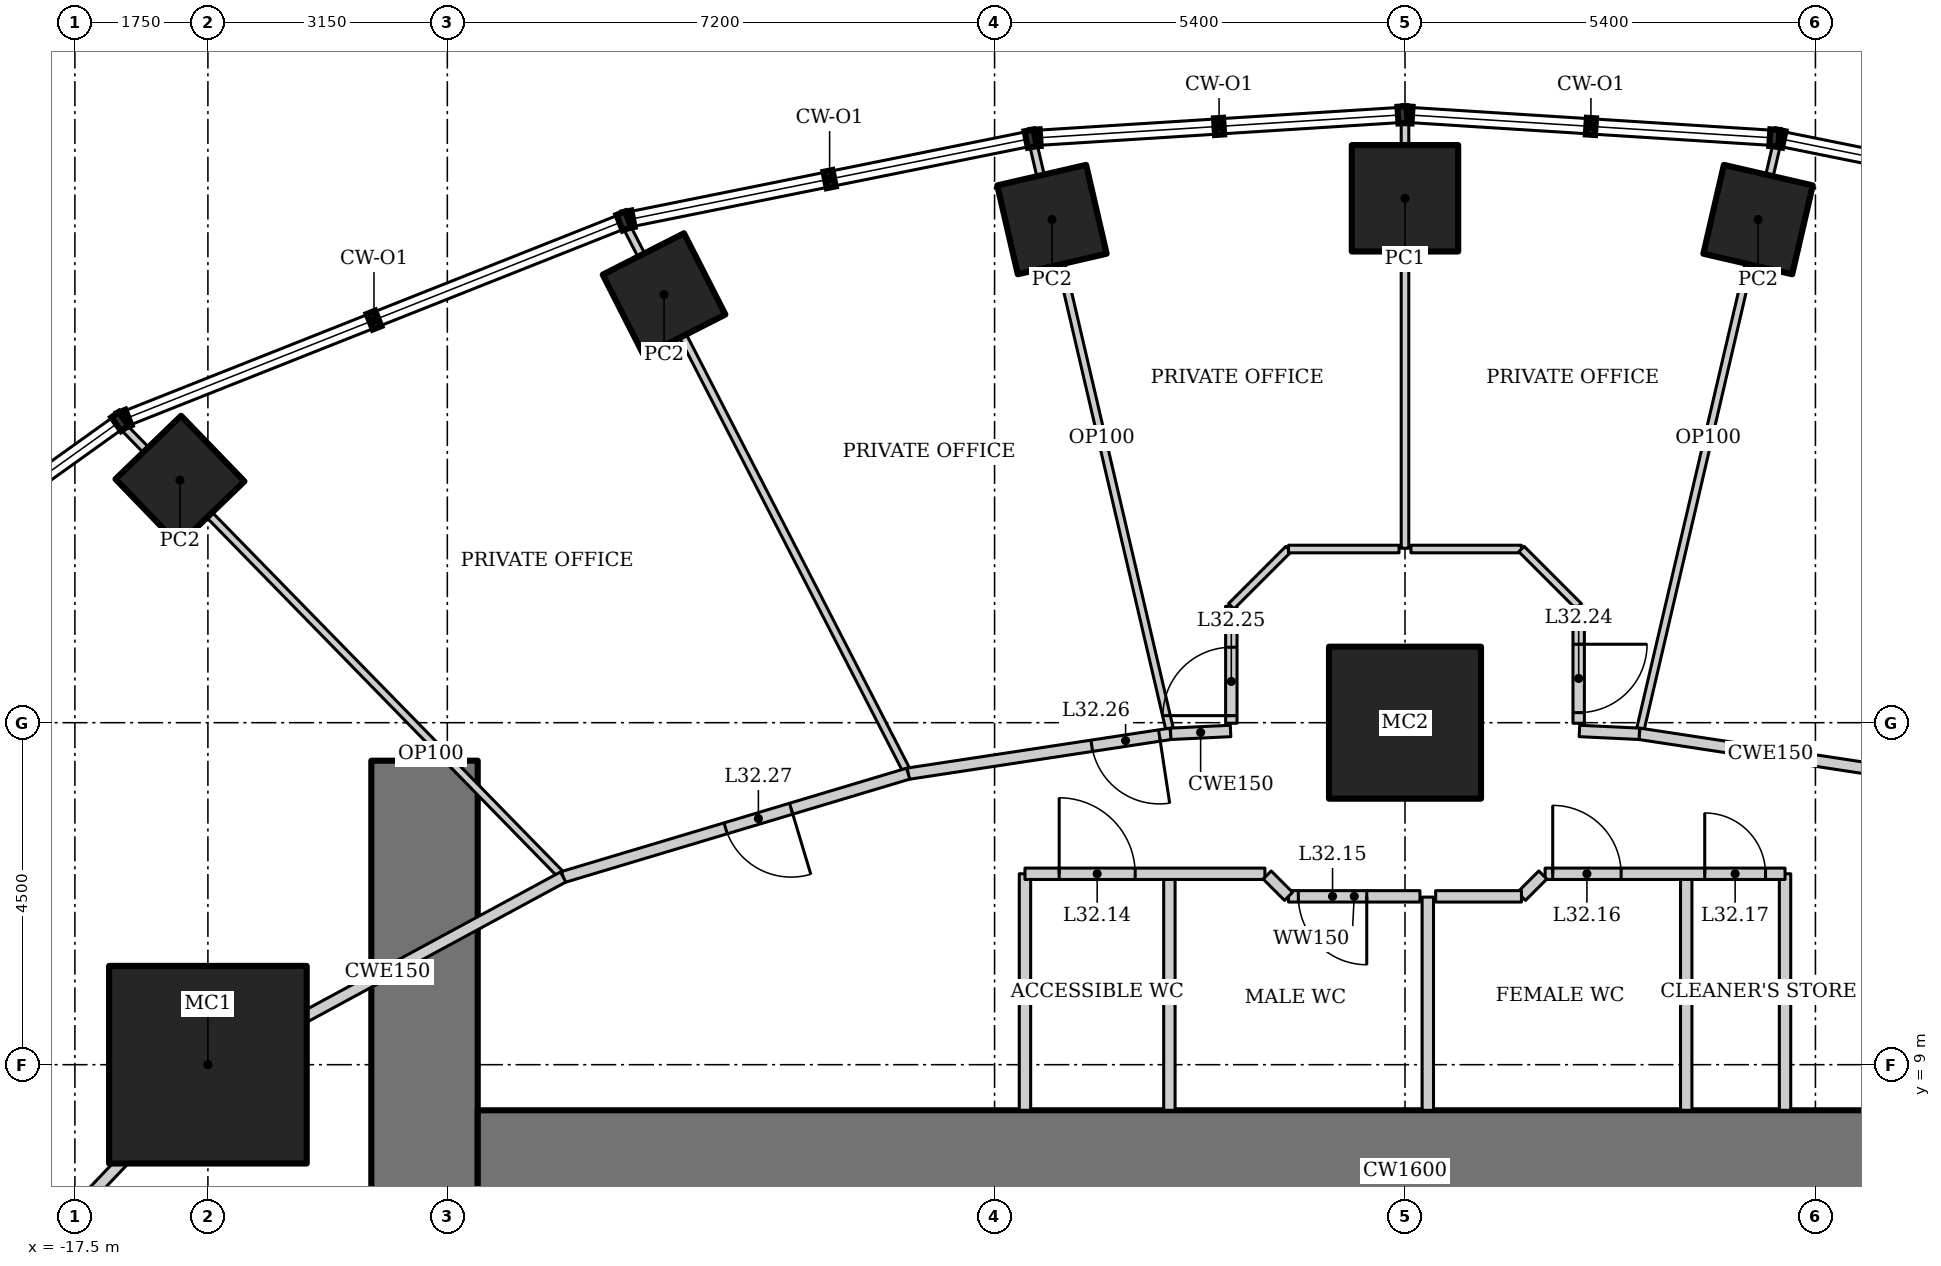
"""IFC4 building model, lengths in metres.
Left out: names, types, materials, properties, quantities, classifications, styles, units other than length and angle.
Written with IfcOpenShell. Run it as: python <this file> out.ifc"""

import sys

from ifc_helpers import new_model, si_unit, direction, frame, frame_2d, origin, origin_2d, place, context, subcontext, project, spatial, rectangle, hollow_rectangle, extrude, element, fill, save


model = new_model("IFC4")
c1 = context("Model", 3, precision=1e-05, world=origin(), true_north=direction((0.0, 1.0)))
c2 = subcontext(c1, "Body", "Model", "MODEL_VIEW")
j1 = project(units=[si_unit("LENGTHUNIT", "METRE"), si_unit("PLANEANGLEUNIT", "RADIAN")], contexts=[c1])
p1 = place(None, origin())
s1 = spatial("IfcSite", under=j1, at=p1, CompositionType="ELEMENT")
p2 = place(p1, origin())
s2 = spatial("IfcBuilding", under=s1, at=p2, CompositionType="ELEMENT")
p3 = place(p2, frame((0.0, 0.0, 138.4)))
s3 = spatial("IfcBuildingStorey", under=s2, at=p3, CompositionType="ELEMENT", Elevation=138.4)
p4 = place(p3, frame((0.0, 13.5, 0.0), z_axis=(0.0, 0.0, 1.0), x_axis=(1.0, 0.0, 0.0)))
e1 = element("IfcColumn", 1, at=p4, inside=s3, PredefinedType="COLUMN", context=c2, shape_type="SweptSolid", body=[
    extrude(hollow_rectangle(XDim=2.0, YDim=2.0, WallThickness=0.17, at=origin_2d()), origin(), (0.0, 0.0, 1.0), 4.2),
])
p5 = place(p3, frame((-15.75, 9.0, 0.0), z_axis=(0.0, 0.0, 1.0), x_axis=(1.0, 0.0, 0.0)))
e2 = element("IfcColumn", 2, at=p5, inside=s3, PredefinedType="COLUMN", context=c2, shape_type="SweptSolid", body=[
    extrude(hollow_rectangle(XDim=2.6, YDim=2.6, WallThickness=0.13, at=origin_2d()), origin(), (0.0, 0.0, 1.0), 4.2),
])
p6 = place(p3, frame((4.645, 20.12, 0.0), z_axis=(0.0, 0.0, 1.0), x_axis=(0.224951054344, 0.974370064785, 0.0)))
e3 = element("IfcColumn", 3, at=p6, inside=s3, PredefinedType="COLUMN", context=c2, shape_type="SweptSolid", body=[
    extrude(hollow_rectangle(XDim=1.2, YDim=1.2, WallThickness=0.1, at=origin_2d()), origin(), (0.0, 0.0, 1.0), 4.2),
])
p7 = place(p3, frame((0.0, 20.4, 0.0), z_axis=(0.0, 0.0, 1.0), x_axis=(1.0, 0.0, 0.0)))
e4 = element("IfcColumn", 4, at=p7, inside=s3, PredefinedType="COLUMN", context=c2, shape_type="SweptSolid", body=[
    extrude(hollow_rectangle(XDim=1.4, YDim=1.4, WallThickness=0.1, at=origin_2d()), origin(), (0.0, 0.0, 1.0), 4.2),
])
for number, where, z_axis, x_axis in (
    (5, (-4.645, 20.12, 0.0), (0.0, 0.0, 1.0), (0.974, 0.225, 0.0)),
    (6, (-9.749, 19.133, 0.0), (0.0, 0.0, 1.0), (0.891, 0.454, 0.0)),
    (7, (-16.118, 16.69, 0.0), (0.0, 0.0, 1.0), (0.719, 0.695, 0.0)),
):
    element("IfcColumn", number, at=place(p3, frame(where, z_axis=z_axis, x_axis=x_axis)), inside=s3, PredefinedType="COLUMN", context=c2, shape_type="SweptSolid", body=[
        extrude(hollow_rectangle(XDim=1.2, YDim=1.2, WallThickness=0.1, at=origin_2d()), origin(), (0.0, 0.0, 1.0), 4.2),
    ])
p8 = place(p3, frame((-12.9, 13.0, 0.0), z_axis=(0.0, 0.0, 1.0), x_axis=(0.0, -1.0, 0.0)))
e8 = element("IfcWall", 8, at=p8, inside=s3, PredefinedType="SHEAR", context=c2, shape_type="SweptSolid", body=[
    extrude(rectangle(XDim=26.0, YDim=1.4, at=frame_2d((13.0, 0.0))), origin(), (0.0, 0.0, 1.0), 4.2),
])
p9 = place(p8, frame((12.1, 0.0, 0.0)))
e9 = element("IfcOpeningElement", 9, at=p9, cuts=e8, PredefinedType="OPENING", context=c2, shape_type="SweptSolid", body=[
    extrude(rectangle(XDim=1.8, YDim=2.1, at=frame_2d((0.9, 1.05))), frame((0.0, 0.71, 0.0), z_axis=(0.0, -1.0, 0.0), x_axis=(1.0, 0.0, 0.0)), (0.0, 0.0, 1.0), 1.42),
])
p10 = place(p3, frame((12.2, 7.6, 0.0), z_axis=(0.0, 0.0, 1.0), x_axis=(-1.0, 0.0, 0.0)))
e10 = element("IfcWall", 10, at=p10, inside=s3, PredefinedType="SHEAR", context=c2, shape_type="SweptSolid", body=[
    extrude(rectangle(XDim=24.4, YDim=1.6, at=frame_2d((12.2, 0.0))), origin(), (0.0, 0.0, 1.0), 4.2),
])
for number, where, z_axis, x_axis in (
    (11, (4.897, 21.135, 0.0), (0.0, 0.0, 1.0), (-0.227, -0.974, 0.0)),
    (12, (-4.897, 21.135, 0.0), (0.0, 0.0, 1.0), (0.227, -0.974, 0.0)),
):
    element("IfcWall", number, at=place(p3, frame(where, z_axis=z_axis, x_axis=x_axis)), inside=s3, PredefinedType="PARTITIONING", context=c2, shape_type="SweptSolid", body=[
        extrude(rectangle(XDim=7.99, YDim=0.1, at=frame_2d((3.995, 0.0))), origin(), (0.0, 0.0, 1.0), 3.293),
    ])
p11 = place(p3, frame((-10.253, 20.052, 0.0), z_axis=(0.0, 0.0, 1.0), x_axis=(0.457535449567, -0.889191381194, 0.0)))
e13 = element("IfcWall", 13, at=p11, inside=s3, PredefinedType="PARTITIONING", context=c2, shape_type="SweptSolid", body=[
    extrude(rectangle(XDim=8.123, YDim=0.1, at=frame_2d((4.061, 0.0))), origin(), (0.0, 0.0, 1.0), 3.349),
])
p12 = place(p3, frame((-16.882, 17.414, 0.0), z_axis=(0.0, 0.0, 1.0), x_axis=(0.698758056249, -0.715358077348, 0.0)))
e14 = element("IfcWall", 14, at=p12, inside=s3, PredefinedType="PARTITIONING", context=c2, shape_type="SweptSolid", body=[
    extrude(rectangle(XDim=8.31, YDim=0.1, at=frame_2d((4.155, 0.0))), origin(), (0.0, 0.0, 1.0), 3.321),
])
p13 = place(p3, frame((6.537, 12.829, 0.0), z_axis=(0.0, 0.0, 1.0), x_axis=(-0.988668719464, 0.150113833987, 0.0)))
e15 = element("IfcWall", 15, at=p13, inside=s3, PredefinedType="PARTITIONING", context=c2, shape_type="SweptSolid", body=[
    extrude(rectangle(XDim=3.493, YDim=0.15, at=frame_2d((1.747, 0.0))), origin(), (0.0, 0.0, 1.0), 4.05),
])
p14 = place(p3, frame((-3.083, 13.354, 0.0), z_axis=(0.0, 0.0, 1.0), x_axis=(-0.988668719464, -0.150113833987, 0.0)))
e16 = element("IfcWall", 16, at=p14, inside=s3, PredefinedType="PARTITIONING", context=c2, shape_type="SweptSolid", body=[
    extrude(rectangle(XDim=3.493, YDim=0.15, at=frame_2d((1.747, 0.0))), origin(), (0.0, 0.0, 1.0), 4.05),
])
p15 = place(p14, frame((0.15, 0.0, 0.0)))
e17 = element("IfcOpeningElement", 17, at=p15, cuts=e16, PredefinedType="OPENING", context=c2, shape_type="SweptSolid", body=[
    extrude(rectangle(XDim=0.9, YDim=2.1, at=frame_2d((0.45, 1.05))), frame((0.0, 0.085, 0.0), z_axis=(0.0, -1.0, 0.0), x_axis=(1.0, 0.0, 0.0)), (0.0, 0.0, 1.0), 0.17),
])
p16 = place(p3, frame((-6.537, 12.829, 0.0), z_axis=(0.0, 0.0, 1.0), x_axis=(-0.957933992798, -0.286988615527, 0.0)))
e18 = element("IfcWall", 18, at=p16, inside=s3, PredefinedType="PARTITIONING", context=c2, shape_type="SweptSolid", body=[
    extrude(rectangle(XDim=4.738, YDim=0.15, at=frame_2d((2.369, 0.0))), origin(), (0.0, 0.0, 1.0), 4.05),
])
p17 = place(p16, frame((1.607, 0.0, 0.0)))
e19 = element("IfcOpeningElement", 19, at=p17, cuts=e18, PredefinedType="OPENING", context=c2, shape_type="SweptSolid", body=[
    extrude(rectangle(XDim=0.9, YDim=2.1, at=frame_2d((0.45, 1.05))), frame((0.0, 0.085, 0.0), z_axis=(0.0, -1.0, 0.0), x_axis=(1.0, 0.0, 0.0)), (0.0, 0.0, 1.0), 0.17),
])
p18 = place(p3, frame((-11.076, 11.469, 0.0), z_axis=(0.0, 0.0, 1.0), x_axis=(-0.879436285334, -0.476016617397, 0.0)))
e20 = element("IfcWall", 20, at=p18, inside=s3, PredefinedType="PARTITIONING", context=c2, shape_type="SweptSolid", body=[
    extrude(rectangle(XDim=5.253, YDim=0.15, at=frame_2d((2.626, 0.0))), origin(), (0.0, 0.0, 1.0), 4.05),
])
p19 = place(p3, frame((-15.696, 8.969, 0.0), z_axis=(0.0, 0.0, 1.0), x_axis=(-0.688797257101, -0.72495402517, 0.0)))
e21 = element("IfcWall", 21, at=p19, inside=s3, PredefinedType="PARTITIONING", context=c2, shape_type="SweptSolid", body=[
    extrude(rectangle(XDim=5.638, YDim=0.15, at=frame_2d((2.819, 0.0))), origin(), (0.0, 0.0, 1.0), 4.05),
])
p20 = place(p19, frame((4.588, 0.0, 0.0)))
e22 = element("IfcOpeningElement", 22, at=p20, cuts=e21, PredefinedType="OPENING", context=c2, shape_type="SweptSolid", body=[
    extrude(rectangle(XDim=0.9, YDim=2.1, at=frame_2d((0.45, 1.05))), frame((0.0, 0.085, 0.0), z_axis=(0.0, -1.0, 0.0), x_axis=(1.0, 0.0, 0.0)), (0.0, 0.0, 1.0), 0.17),
])
for number, where, z_axis, x_axis in (
    (23, (-5.0, 8.4, 0.0), (0.0, 0.0, 1.0), (0.0, 1.0, 0.0)),
    (24, (5.0, 8.4, 0.0), (0.0, 0.0, 1.0), (0.0, 1.0, 0.0)),
    (25, (-3.1, 8.4, 0.0), (0.0, 0.0, 1.0), (0.0, 1.0, 0.0)),
    (26, (3.7, 8.4, 0.0), (0.0, 0.0, 1.0), (0.0, 1.0, 0.0)),
):
    element("IfcWall", number, at=place(p3, frame(where, z_axis=z_axis, x_axis=x_axis)), inside=s3, PredefinedType="SOLIDWALL", context=c2, shape_type="SweptSolid", body=[
        extrude(rectangle(XDim=3.112, YDim=0.15, at=frame_2d((1.556, 0.0))), origin(), (0.0, 0.0, 1.0), 4.05),
    ])
p21 = place(p3, frame((-12.9, 13.0, 0.0), z_axis=(0.0, 0.0, 1.0), x_axis=(0.714845300066, 0.699282630253, 0.0)))
e27 = element("IfcWall", 27, at=p21, inside=s3, PredefinedType="PARTITIONING", context=c2, shape_type="SweptSolid", body=[
    extrude(rectangle(XDim=0.235, YDim=0.1, at=frame_2d((0.118, 0.0))), origin(), (0.0, 0.0, 1.0), 4.05),
])
p22 = place(p3, frame((0.0, 21.445, 0.0), z_axis=(0.0, 0.0, 1.0), x_axis=(0.0, -1.0, 0.0)))
e28 = element("IfcWall", 28, at=p22, inside=s3, PredefinedType="PARTITIONING", context=c2, shape_type="SweptSolid", body=[
    extrude(rectangle(XDim=5.65, YDim=0.1, at=frame_2d((2.825, 0.0))), origin(), (0.0, 0.0, 1.0), 3.646),
])
for number, where, z_axis, x_axis in (
    (29, (3.083, 13.354, 0.0), (0.0, 0.0, 1.0), (-0.999, 0.047, 0.0)),
    (30, (-2.295, 13.391, 0.0), (0.0, 0.0, 1.0), (-0.999, -0.047, 0.0)),
):
    element("IfcWall", number, at=place(p3, frame(where, z_axis=z_axis, x_axis=x_axis)), inside=s3, PredefinedType="PARTITIONING", context=c2, shape_type="SweptSolid", body=[
        extrude(rectangle(XDim=0.789, YDim=0.15, at=frame_2d((0.395, 0.0))), origin(), (0.0, 0.0, 1.0), 4.05),
    ])
p23 = place(p3, frame((-5.0, 11.512, 0.0), z_axis=(0.0, 0.0, 1.0), x_axis=(1.0, 0.0, 0.0)))
e31 = element("IfcWall", 31, at=p23, inside=s3, PredefinedType="SOLIDWALL", context=c2, shape_type="SweptSolid", body=[
    extrude(rectangle(XDim=3.156, YDim=0.15, at=frame_2d((1.578, 0.0))), origin(), (0.0, 0.0, 1.0), 4.05),
])
p24 = place(p23, frame((0.45, 0.0, 0.0)))
e32 = element("IfcOpeningElement", 32, at=p24, cuts=e31, PredefinedType="OPENING", context=c2, shape_type="SweptSolid", body=[
    extrude(rectangle(XDim=1.0, YDim=2.1, at=frame_2d((0.5, 1.05))), frame((0.0, 0.085, 0.0), z_axis=(0.0, -1.0, 0.0), x_axis=(1.0, 0.0, 0.0)), (0.0, 0.0, 1.0), 0.17),
])
p25 = place(p3, frame((1.844, 11.512, 0.0), z_axis=(0.0, 0.0, 1.0), x_axis=(1.0, 0.0, 0.0)))
e33 = element("IfcWall", 33, at=p25, inside=s3, PredefinedType="SOLIDWALL", context=c2, shape_type="SweptSolid", body=[
    extrude(rectangle(XDim=3.156, YDim=0.15, at=frame_2d((1.578, 0.0))), origin(), (0.0, 0.0, 1.0), 4.05),
])
p26 = place(p25, frame((0.1, 0.0, 0.0)))
e34 = element("IfcOpeningElement", 34, at=p26, cuts=e33, PredefinedType="OPENING", context=c2, shape_type="SweptSolid", body=[
    extrude(rectangle(XDim=0.9, YDim=2.1, at=frame_2d((0.45, 1.05))), frame((0.0, 0.085, 0.0), z_axis=(0.0, -1.0, 0.0), x_axis=(1.0, 0.0, 0.0)), (0.0, 0.0, 1.0), 0.17),
])
p27 = place(p25, frame((2.1, 0.0, 0.0)))
e35 = element("IfcOpeningElement", 35, at=p27, cuts=e33, PredefinedType="OPENING", context=c2, shape_type="SweptSolid", body=[
    extrude(rectangle(XDim=0.8, YDim=2.1, at=frame_2d((0.4, 1.05))), frame((0.0, 0.085, 0.0), z_axis=(0.0, -1.0, 0.0), x_axis=(1.0, 0.0, 0.0)), (0.0, 0.0, 1.0), 0.17),
])
p28 = place(p3, frame((0.3, 8.4, 0.0), z_axis=(0.0, 0.0, 1.0), x_axis=(0.0, 1.0, 0.0)))
e36 = element("IfcWall", 36, at=p28, inside=s3, PredefinedType="SOLIDWALL", context=c2, shape_type="SweptSolid", body=[
    extrude(rectangle(XDim=2.805, YDim=0.15, at=frame_2d((1.403, 0.0))), origin(), (0.0, 0.0, 1.0), 4.05),
])
p29 = place(p3, frame((0.197, 11.215, 0.0), z_axis=(0.0, 0.0, 1.0), x_axis=(-1.0, 0.0, 0.0)))
e37 = element("IfcWall", 37, at=p29, inside=s3, PredefinedType="SOLIDWALL", context=c2, shape_type="SweptSolid", body=[
    extrude(rectangle(XDim=1.729, YDim=0.15, at=frame_2d((0.865, 0.0))), origin(), (0.0, 0.0, 1.0), 4.05),
])
p30 = place(p29, frame((0.7, 0.0, 0.0)))
e38 = element("IfcOpeningElement", 38, at=p30, cuts=e37, PredefinedType="OPENING", context=c2, shape_type="SweptSolid", body=[
    extrude(rectangle(XDim=0.9, YDim=2.1, at=frame_2d((0.45, 1.05))), frame((0.0, 0.085, 0.0), z_axis=(0.0, -1.0, 0.0), x_axis=(1.0, 0.0, 0.0)), (0.0, 0.0, 1.0), 0.17),
])
for number, where, z_axis, x_axis in (
    (39, (-1.532, 11.215, 0.0), (0.0, 0.0, 1.0), (-0.707, 0.707, 0.0)),
    (40, (1.813, 11.496, 0.0), (0.0, 0.0, 1.0), (-0.707, -0.707, 0.0)),
):
    element("IfcWall", number, at=place(p3, frame(where, z_axis=z_axis, x_axis=x_axis)), inside=s3, PredefinedType="SOLIDWALL", context=c2, shape_type="SweptSolid", body=[
        extrude(rectangle(XDim=0.397, YDim=0.15, at=frame_2d((0.199, 0.0))), origin(), (0.0, 0.0, 1.0), 4.05),
    ])
p31 = place(p3, frame((1.532, 11.215, 0.0), z_axis=(0.0, 0.0, 1.0), x_axis=(-1.0, 0.0, 0.0)))
e41 = element("IfcWall", 41, at=p31, inside=s3, PredefinedType="SOLIDWALL", context=c2, shape_type="SweptSolid", body=[
    extrude(rectangle(XDim=1.129, YDim=0.15, at=frame_2d((0.564, 0.0))), origin(), (0.0, 0.0, 1.0), 4.05),
])
p32 = place(p3, frame((0.078, 15.785, 0.0), z_axis=(0.0, 0.0, 1.0), x_axis=(1.0, 0.0, 0.0)))
e42 = element("IfcWall", 42, at=p32, inside=s3, PredefinedType="PARTITIONING", context=c2, shape_type="SweptSolid", body=[
    extrude(rectangle(XDim=1.454, YDim=0.1, at=frame_2d((0.727, 0.0))), origin(), (0.0, 0.0, 1.0), 4.05),
])
p33 = place(p3, frame((1.532, 15.785, 0.0), z_axis=(0.0, 0.0, 1.0), x_axis=(0.707106781187, -0.707106781187, 0.0)))
e43 = element("IfcWall", 43, at=p33, inside=s3, PredefinedType="PARTITIONING", context=c2, shape_type="SweptSolid", body=[
    extrude(rectangle(XDim=1.064, YDim=0.1, at=frame_2d((0.532, 0.0))), origin(), (0.0, 0.0, 1.0), 4.05),
])
p34 = place(p3, frame((2.285, 15.032, 0.0), z_axis=(0.0, 0.0, 1.0), x_axis=(0.0, -1.0, 0.0)))
e44 = element("IfcWall", 44, at=p34, inside=s3, PredefinedType="PARTITIONING", context=c2, shape_type="SweptSolid", body=[
    extrude(rectangle(XDim=1.54, YDim=0.15, at=frame_2d((0.77, 0.0))), origin(), (0.0, 0.0, 1.0), 4.05),
])
p35 = place(p34, frame((0.5, 0.0, 0.0)))
e45 = element("IfcOpeningElement", 45, at=p35, cuts=e44, PredefinedType="OPENING", context=c2, shape_type="SweptSolid", body=[
    extrude(rectangle(XDim=0.9, YDim=2.1, at=frame_2d((0.45, 1.05))), frame((0.0, 0.085, 0.0), z_axis=(0.0, -1.0, 0.0), x_axis=(1.0, 0.0, 0.0)), (0.0, 0.0, 1.0), 0.17),
])
p36 = place(p3, frame((-2.285, 13.493, 0.0), z_axis=(0.0, 0.0, 1.0), x_axis=(0.0, 1.0, 0.0)))
e46 = element("IfcWall", 46, at=p36, inside=s3, PredefinedType="PARTITIONING", context=c2, shape_type="SweptSolid", body=[
    extrude(rectangle(XDim=1.54, YDim=0.15, at=frame_2d((0.77, 0.0))), origin(), (0.0, 0.0, 1.0), 4.05),
])
p37 = place(p36, frame((0.1, 0.0, 0.0)))
e47 = element("IfcOpeningElement", 47, at=p37, cuts=e46, PredefinedType="OPENING", context=c2, shape_type="SweptSolid", body=[
    extrude(rectangle(XDim=0.9, YDim=2.1, at=frame_2d((0.45, 1.05))), frame((0.0, 0.085, 0.0), z_axis=(0.0, -1.0, 0.0), x_axis=(1.0, 0.0, 0.0)), (0.0, 0.0, 1.0), 0.17),
])
p38 = place(p3, frame((-2.285, 15.032, 0.0), z_axis=(0.0, 0.0, 1.0), x_axis=(0.707106781187, 0.707106781187, 0.0)))
e48 = element("IfcWall", 48, at=p38, inside=s3, PredefinedType="PARTITIONING", context=c2, shape_type="SweptSolid", body=[
    extrude(rectangle(XDim=1.064, YDim=0.1, at=frame_2d((0.532, 0.0))), origin(), (0.0, 0.0, 1.0), 4.05),
])
p39 = place(p3, frame((-1.532, 15.785, 0.0), z_axis=(0.0, 0.0, 1.0), x_axis=(1.0, 0.0, 0.0)))
e49 = element("IfcWall", 49, at=p39, inside=s3, PredefinedType="PARTITIONING", context=c2, shape_type="SweptSolid", body=[
    extrude(rectangle(XDim=1.454, YDim=0.1, at=frame_2d((0.727, 0.0))), origin(), (0.0, 0.0, 1.0), 4.05),
])
p40 = place(p24, origin())
e50 = element("IfcDoor", 50, at=p40, inside=s3, OperationType="SINGLE_SWING_LEFT", PredefinedType="DOOR", context=c2, shape_type="SweptSolid", body=[
    extrude(rectangle(XDim=1.0, YDim=2.1, at=frame_2d((0.5, 1.05))), frame((0.0, 0.025, 0.0), z_axis=(0.0, -1.0, 0.0), x_axis=(1.0, 0.0, 0.0)), (0.0, 0.0, 1.0), 0.05),
])
fill(e32, e50)
p41 = place(p30, origin())
e51 = element("IfcDoor", 51, at=p41, inside=s3, OperationType="SINGLE_SWING_LEFT", PredefinedType="DOOR", context=c2, shape_type="SweptSolid", body=[
    extrude(rectangle(XDim=0.9, YDim=2.1, at=frame_2d((0.45, 1.05))), frame((0.0, 0.025, 0.0), z_axis=(0.0, -1.0, 0.0), x_axis=(1.0, 0.0, 0.0)), (0.0, 0.0, 1.0), 0.05),
])
fill(e38, e51)
p42 = place(p26, origin())
e52 = element("IfcDoor", 52, at=p42, inside=s3, OperationType="SINGLE_SWING_LEFT", PredefinedType="DOOR", context=c2, shape_type="SweptSolid", body=[
    extrude(rectangle(XDim=0.9, YDim=2.1, at=frame_2d((0.45, 1.05))), frame((0.0, 0.025, 0.0), z_axis=(0.0, -1.0, 0.0), x_axis=(1.0, 0.0, 0.0)), (0.0, 0.0, 1.0), 0.05),
])
fill(e34, e52)
p43 = place(p27, origin())
e53 = element("IfcDoor", 53, at=p43, inside=s3, OperationType="SINGLE_SWING_LEFT", PredefinedType="DOOR", context=c2, shape_type="SweptSolid", body=[
    extrude(rectangle(XDim=0.8, YDim=2.1, at=frame_2d((0.4, 1.05))), frame((0.0, 0.025, 0.0), z_axis=(0.0, -1.0, 0.0), x_axis=(1.0, 0.0, 0.0)), (0.0, 0.0, 1.0), 0.05),
])
fill(e35, e53)
p44 = place(p35, origin())
e54 = element("IfcDoor", 54, at=p44, inside=s3, OperationType="SINGLE_SWING_LEFT", PredefinedType="DOOR", context=c2, shape_type="SweptSolid", body=[
    extrude(rectangle(XDim=0.9, YDim=2.1, at=frame_2d((0.45, 1.05))), frame((0.0, 0.025, 0.0), z_axis=(0.0, -1.0, 0.0), x_axis=(1.0, 0.0, 0.0)), (0.0, 0.0, 1.0), 0.05),
])
fill(e45, e54)
p45 = place(p37, origin())
e55 = element("IfcDoor", 55, at=p45, inside=s3, OperationType="SINGLE_SWING_LEFT", PredefinedType="DOOR", context=c2, shape_type="SweptSolid", body=[
    extrude(rectangle(XDim=0.9, YDim=2.1, at=frame_2d((0.45, 1.05))), frame((0.0, 0.025, 0.0), z_axis=(0.0, -1.0, 0.0), x_axis=(1.0, 0.0, 0.0)), (0.0, 0.0, 1.0), 0.05),
])
fill(e47, e55)
p46 = place(p15, origin())
e56 = element("IfcDoor", 56, at=p46, inside=s3, OperationType="SINGLE_SWING_LEFT", PredefinedType="DOOR", context=c2, shape_type="SweptSolid", body=[
    extrude(rectangle(XDim=0.9, YDim=2.1, at=frame_2d((0.45, 1.05))), frame((0.0, 0.025, 0.0), z_axis=(0.0, -1.0, 0.0), x_axis=(1.0, 0.0, 0.0)), (0.0, 0.0, 1.0), 0.05),
])
fill(e17, e56)
p47 = place(p17, origin())
e57 = element("IfcDoor", 57, at=p47, inside=s3, OperationType="SINGLE_SWING_LEFT", PredefinedType="DOOR", context=c2, shape_type="SweptSolid", body=[
    extrude(rectangle(XDim=0.9, YDim=2.1, at=frame_2d((0.45, 1.05))), frame((0.0, 0.025, 0.0), z_axis=(0.0, -1.0, 0.0), x_axis=(1.0, 0.0, 0.0)), (0.0, 0.0, 1.0), 0.05),
])
fill(e19, e57)
save(model, sys.argv[1])
